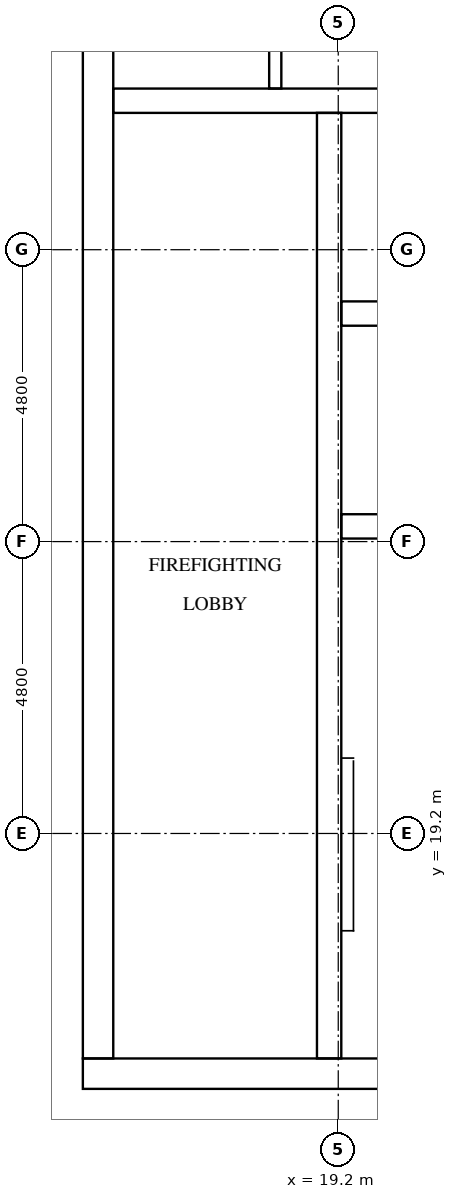
"""IFC4 building model, lengths in metres.
Left out: names, types, materials, properties, quantities, classifications, styles, units other than length and angle.
Written with IfcOpenShell. Run it as: python <this file> out.ifc"""

import sys

from ifc_helpers import new_model, si_unit, direction, frame, frame_2d, origin, place, context, subcontext, project, spatial, rectangle, extrude, element, fill, save


model = new_model("IFC4")
c1 = context("Model", 3, precision=1e-05, world=origin(), true_north=direction((0.0, 1.0)))
c2 = subcontext(c1, "Body", "Model", "MODEL_VIEW")
j1 = project(units=[si_unit("LENGTHUNIT", "METRE"), si_unit("PLANEANGLEUNIT", "RADIAN")], contexts=[c1])
p1 = place(None, origin())
s1 = spatial("IfcSite", under=j1, at=p1, CompositionType="ELEMENT")
p2 = place(p1, origin())
s2 = spatial("IfcBuilding", under=s1, at=p2, CompositionType="ELEMENT")
p3 = place(p2, frame((0.0, 0.0, 282.6)))
s3 = spatial("IfcBuildingStorey", under=s2, at=p3, CompositionType="ELEMENT", Elevation=282.6)
p4 = place(p3, frame((15.0, 15.25, 0.0), z_axis=(0.0, 0.0, 1.0), x_axis=(1.0, 0.0, 0.0)))
e1 = element("IfcWall", 1, at=p4, inside=s3, PredefinedType="SHEAR", context=c2, shape_type="SweptSolid", body=[
    extrude(rectangle(XDim=32.4, YDim=0.5, at=frame_2d((16.2, 0.0))), origin(), (0.0, 0.0, 1.0), 3.2),
])
p5 = place(p4, frame((15.3, 0.0, 0.0)))
e2 = element("IfcOpeningElement", 2, at=p5, cuts=e1, PredefinedType="OPENING", context=c2, shape_type="SweptSolid", body=[
    extrude(rectangle(XDim=1.8, YDim=2.1, at=frame_2d((0.9, 1.05))), frame((0.0, 0.26, 0.0), z_axis=(0.0, -1.0, 0.0), x_axis=(1.0, 0.0, 0.0)), (0.0, 0.0, 1.0), 0.52),
])
p6 = place(p3, frame((15.25, 15.5, 0.0), z_axis=(0.0, 0.0, 1.0), x_axis=(0.0, 1.0, 0.0)))
e3 = element("IfcWall", 3, at=p6, inside=s3, PredefinedType="SHEAR", context=c2, shape_type="SweptSolid", body=[
    extrude(rectangle(XDim=21.8, YDim=0.5, at=frame_2d((10.9, 0.0))), origin(), (0.0, 0.0, 1.0), 3.2),
])
p7 = place(p6, frame((5.26, 0.0, 0.0)))
e4 = element("IfcOpeningElement", 4, at=p7, cuts=e3, PredefinedType="OPENING", context=c2, shape_type="SweptSolid", body=[
    extrude(rectangle(XDim=1.2, YDim=2.1, at=frame_2d((0.6, 1.05))), frame((0.0, 0.26, 0.0), z_axis=(0.0, -1.0, 0.0), x_axis=(1.0, 0.0, 0.0)), (0.0, 0.0, 1.0), 0.52),
])
p8 = place(p3, frame((19.05, 15.5, 0.0), z_axis=(0.0, 0.0, 1.0), x_axis=(0.0, 1.0, 0.0)))
e5 = element("IfcWall", 5, at=p8, inside=s3, PredefinedType="SHEAR", context=c2, shape_type="SweptSolid", body=[
    extrude(rectangle(XDim=15.55, YDim=0.4, at=frame_2d((7.775, 0.0))), origin(), (0.0, 0.0, 1.0), 3.2),
])
p9 = place(p8, frame((9.95, 0.0, 0.0)))
e6 = element("IfcOpeningElement", 6, at=p9, cuts=e5, PredefinedType="OPENING", context=c2, shape_type="SweptSolid", body=[
    extrude(rectangle(XDim=1.1, YDim=2.1, at=frame_2d((0.55, 1.05))), frame((0.0, 0.21, 0.0), z_axis=(0.0, -1.0, 0.0), x_axis=(1.0, 0.0, 0.0)), (0.0, 0.0, 1.0), 0.42),
])
p10 = place(p8, frame((13.45, 0.0, 0.0)))
e7 = element("IfcOpeningElement", 7, at=p10, cuts=e5, PredefinedType="OPENING", context=c2, shape_type="SweptSolid", body=[
    extrude(rectangle(XDim=1.1, YDim=2.1, at=frame_2d((0.55, 1.05))), frame((0.0, 0.21, 0.0), z_axis=(0.0, -1.0, 0.0), x_axis=(1.0, 0.0, 0.0)), (0.0, 0.0, 1.0), 0.42),
])
p11 = place(p8, frame((0.7, 0.0, 0.0)))
e8 = element("IfcOpeningElement", 8, at=p11, cuts=e5, PredefinedType="OPENING", context=c2, shape_type="SweptSolid", body=[
    extrude(rectangle(XDim=1.2, YDim=2.1, at=frame_2d((0.6, 1.05))), frame((0.0, 0.21, 0.0), z_axis=(0.0, -1.0, 0.0), x_axis=(1.0, 0.0, 0.0)), (0.0, 0.0, 1.0), 0.42),
])
for number, where, z_axis, x_axis in (
    (9, (19.25, 24.25, 0.0), (0.0, 0.0, 1.0), (1.0, 0.0, 0.0)),
    (10, (19.25, 27.75, 0.0), (0.0, 0.0, 1.0), (1.0, 0.0, 0.0)),
):
    element("IfcWall", number, at=place(p3, frame(where, z_axis=z_axis, x_axis=x_axis)), inside=s3, PredefinedType="SHEAR", context=c2, shape_type="SweptSolid", body=[
        extrude(rectangle(XDim=3.65, YDim=0.4, at=frame_2d((1.825, 0.0))), origin(), (0.0, 0.0, 1.0), 3.2),
    ])
p12 = place(p3, frame((15.5, 31.25, 0.0), z_axis=(0.0, 0.0, 1.0), x_axis=(1.0, 0.0, 0.0)))
e11 = element("IfcWall", 11, at=p12, inside=s3, PredefinedType="SHEAR", context=c2, shape_type="SweptSolid", body=[
    extrude(rectangle(XDim=7.4, YDim=0.4, at=frame_2d((3.7, 0.0))), origin(), (0.0, 0.0, 1.0), 3.2),
])
p13 = place(p3, frame((18.164, 31.45, 0.0), z_axis=(0.0, 0.0, 1.0), x_axis=(0.0, 1.0, 0.0)))
e12 = element("IfcWall", 12, at=p13, inside=s3, PredefinedType="PARTITIONING", context=c2, shape_type="SweptSolid", body=[
    extrude(rectangle(XDim=5.85, YDim=0.2, at=frame_2d((2.925, 0.0))), origin(), (0.0, 0.0, 1.0), 3.2),
])
p14 = place(p9, origin())
e13 = element("IfcDoor", 13, at=p14, inside=s3, OperationType="DOUBLE_DOOR_SLIDING", PredefinedType="DOOR", context=c2, shape_type="SweptSolid", body=[
    extrude(rectangle(XDim=1.1, YDim=2.1, at=frame_2d((0.55, 1.05))), frame((0.0, 0.025, 0.0), z_axis=(0.0, -1.0, 0.0), x_axis=(1.0, 0.0, 0.0)), (0.0, 0.0, 1.0), 0.05),
])
fill(e6, e13)
p15 = place(p10, origin())
e14 = element("IfcDoor", 14, at=p15, inside=s3, OperationType="DOUBLE_DOOR_SLIDING", PredefinedType="DOOR", context=c2, shape_type="SweptSolid", body=[
    extrude(rectangle(XDim=1.1, YDim=2.1, at=frame_2d((0.55, 1.05))), frame((0.0, 0.025, 0.0), z_axis=(0.0, -1.0, 0.0), x_axis=(1.0, 0.0, 0.0)), (0.0, 0.0, 1.0), 0.05),
])
fill(e7, e14)
p16 = place(p11, frame((1.2, 0.0, 0.0), z_axis=(0.0, 0.0, 1.0), x_axis=(-1.0, 0.0, 0.0)))
e15 = element("IfcDoor", 15, at=p16, inside=s3, OperationType="SINGLE_SWING_RIGHT", PredefinedType="DOOR", context=c2, shape_type="SweptSolid", body=[
    extrude(rectangle(XDim=1.2, YDim=2.1, at=frame_2d((0.6, 1.05))), frame((0.0, 0.025, 0.0), z_axis=(0.0, -1.0, 0.0), x_axis=(1.0, 0.0, 0.0)), (0.0, 0.0, 1.0), 0.05),
])
fill(e8, e15)
p17 = place(p7, frame((1.2, 0.0, 0.0), z_axis=(0.0, 0.0, 1.0), x_axis=(-1.0, 0.0, 0.0)))
e16 = element("IfcDoor", 16, at=p17, inside=s3, OperationType="SINGLE_SWING_LEFT", PredefinedType="DOOR", context=c2, shape_type="SweptSolid", body=[
    extrude(rectangle(XDim=1.2, YDim=2.1, at=frame_2d((0.6, 1.05))), frame((0.0, 0.025, 0.0), z_axis=(0.0, -1.0, 0.0), x_axis=(1.0, 0.0, 0.0)), (0.0, 0.0, 1.0), 0.05),
])
fill(e4, e16)
save(model, sys.argv[1])
